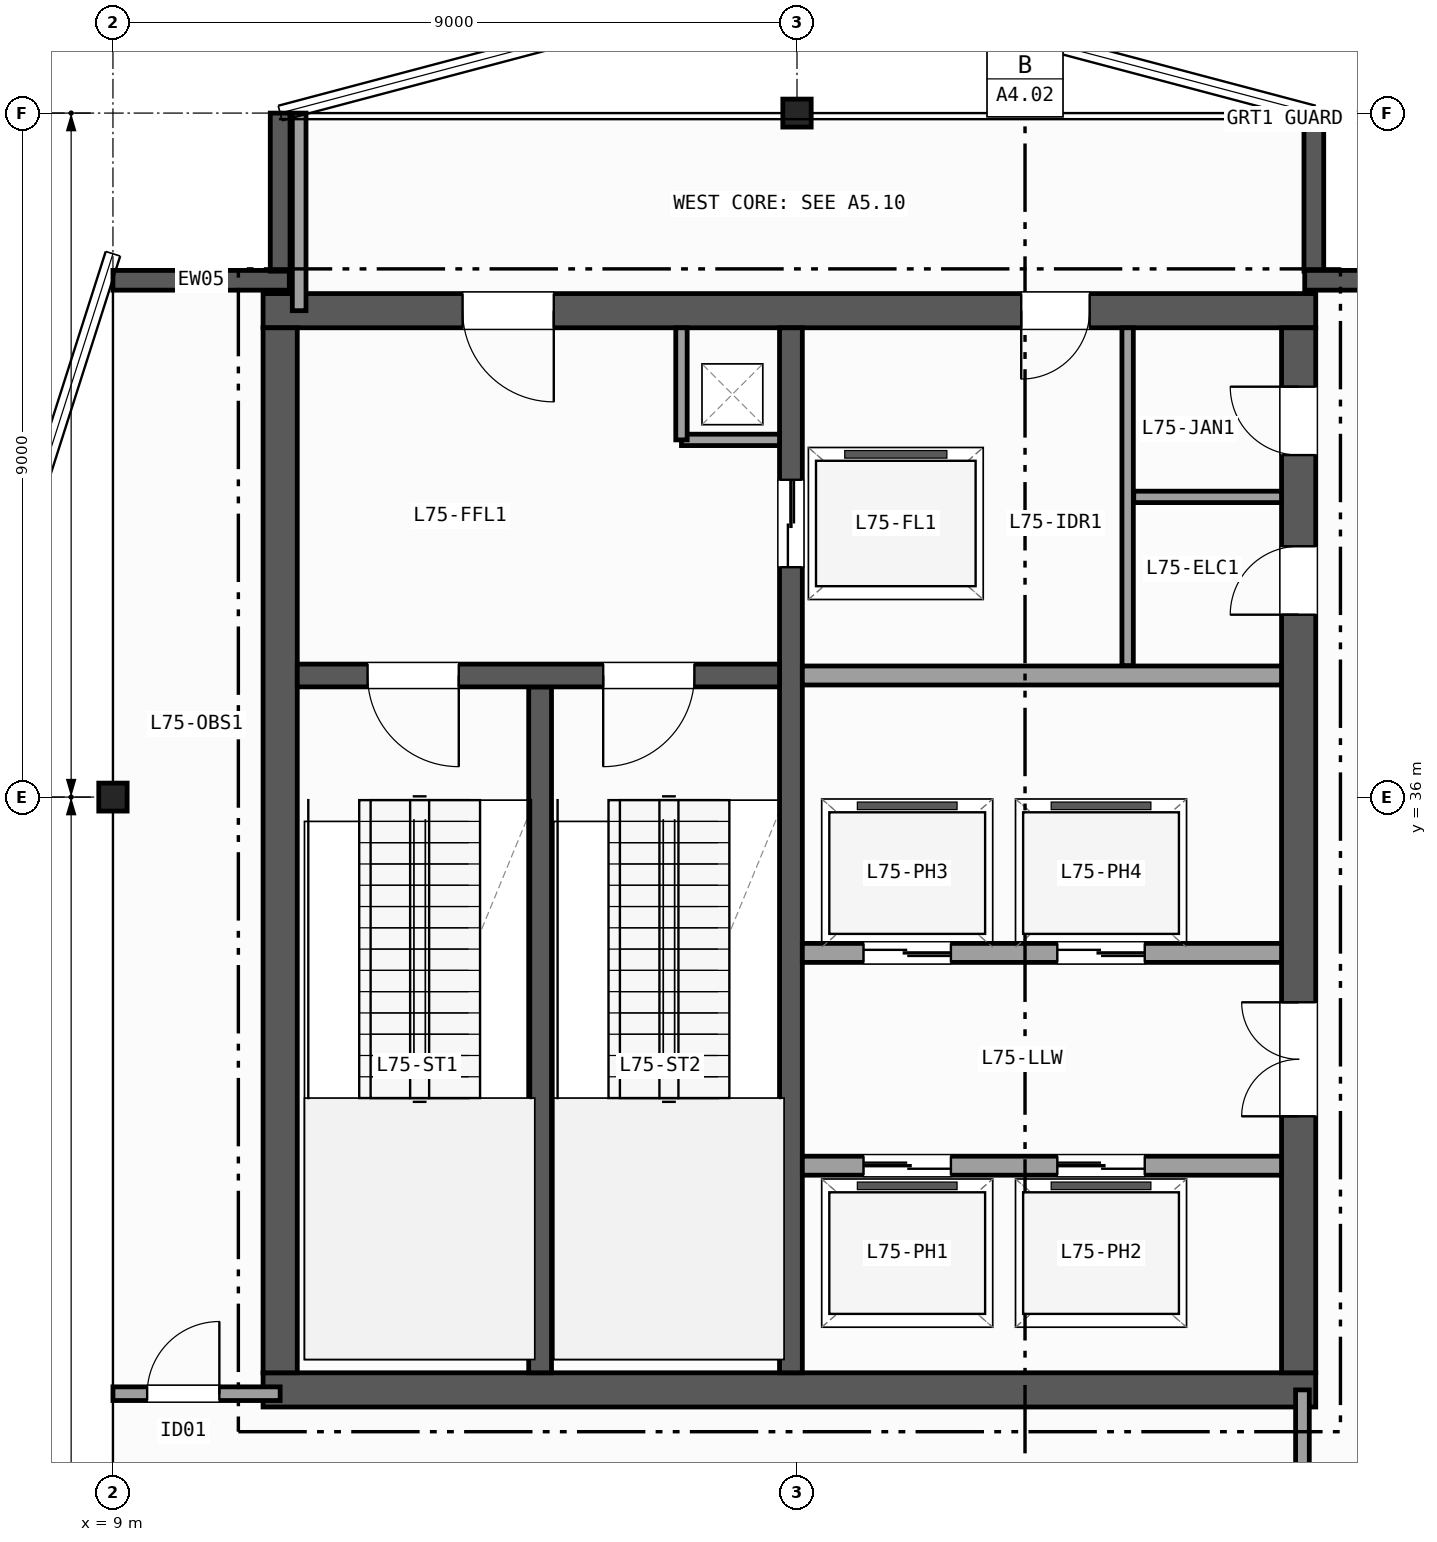
"""IFC4 building model, lengths in metres.
Left out: names, types, materials, properties, quantities, classifications, styles, units other than length and angle.
Written with IfcOpenShell. Run it as: python <this file> out.ifc"""

import sys

from ifc_helpers import new_model, si_unit, direction, frame, frame_2d, origin, origin_2d, place, context, subcontext, project, spatial, rectangle, i_section, extrude, element, fill, save


model = new_model("IFC4")
c1 = context("Model", 3, precision=1e-05, world=origin(), true_north=direction((0.0, 1.0)))
c2 = subcontext(c1, "Body", "Model", "MODEL_VIEW")
j1 = project(units=[si_unit("LENGTHUNIT", "METRE"), si_unit("PLANEANGLEUNIT", "RADIAN")], contexts=[c1])
p1 = place(None, origin())
s1 = spatial("IfcSite", under=j1, at=p1, CompositionType="ELEMENT")
p2 = place(p1, origin())
s2 = spatial("IfcBuilding", under=s1, at=p2, CompositionType="ELEMENT")
p3 = place(p2, frame((0.0, 0.0, 297.4)))
s3 = spatial("IfcBuildingStorey", under=s2, at=p3, CompositionType="ELEMENT", Elevation=297.4)
for number, where, z_axis, x_axis in (
    (1, (9.0, 36.0, 0.0), (0.0, 0.0, 1.0), (1.0, 0.0, 0.0)),
    (2, (18.0, 45.0, 0.0), (0.0, 0.0, 1.0), (1.0, 0.0, 0.0)),
):
    element("IfcColumn", number, at=place(p3, frame(where, z_axis=z_axis, x_axis=x_axis)), inside=s3, PredefinedType="COLUMN", context=c2, shape_type="SweptSolid", body=[
        extrude(i_section(OverallWidth=0.373, OverallDepth=0.368, WebThickness=0.015, FlangeThickness=0.024, FilletRadius=0.015, at=origin_2d()), origin(), (0.0, 0.0, 1.0), 5.2),
    ])
p4 = place(p3, frame((9.0, 42.8, 0.0), z_axis=(0.0, 0.0, 1.0), x_axis=(1.0, 0.0, 0.0)))
e3 = element("IfcWall", 3, at=p4, inside=s3, PredefinedType="SOLIDWALL", context=c2, shape_type="SweptSolid", body=[
    extrude(rectangle(XDim=2.32, YDim=0.26, at=frame_2d((1.16, 0.0))), origin(), (0.0, 0.0, 1.0), 4.87),
])
for number, where, z_axis, x_axis in (
    (4, (11.2, 42.92, 0.0), (0.0, 0.0, 1.0), (0.0, 1.0, 0.0)),
    (5, (24.8, 45.0, 0.0), (0.0, 0.0, 1.0), (0.0, -1.0, 0.0)),
):
    element("IfcWall", number, at=place(p3, frame(where, z_axis=z_axis, x_axis=x_axis)), inside=s3, PredefinedType="SOLIDWALL", context=c2, shape_type="SweptSolid", body=[
        extrude(rectangle(XDim=2.08, YDim=0.26, at=frame_2d((1.04, 0.0))), origin(), (0.0, 0.0, 1.0), 4.87),
    ])
p5 = place(p3, frame((24.68, 42.8, 0.0), z_axis=(0.0, 0.0, 1.0), x_axis=(1.0, 0.0, 0.0)))
e6 = element("IfcWall", 6, at=p5, inside=s3, PredefinedType="SOLIDWALL", context=c2, shape_type="SweptSolid", body=[
    extrude(rectangle(XDim=2.32, YDim=0.26, at=frame_2d((1.16, 0.0))), origin(), (0.0, 0.0, 1.0), 4.87),
])
p6 = place(p3, frame((10.975, 28.2, 0.0), z_axis=(0.0, 0.0, 1.0), x_axis=(1.0, 0.0, 0.0)))
e7 = element("IfcWall", 7, at=p6, inside=s3, PredefinedType="SHEAR", context=c2, shape_type="SweptSolid", body=[
    extrude(rectangle(XDim=13.85, YDim=0.45, at=frame_2d((6.925, 0.0))), origin(), (0.0, 0.0, 1.0), 4.87),
])
p7 = place(p3, frame((24.825, 42.4, 0.0), z_axis=(0.0, 0.0, 1.0), x_axis=(-1.0, 0.0, 0.0)))
e8 = element("IfcWall", 8, at=p7, inside=s3, PredefinedType="SHEAR", context=c2, shape_type="SweptSolid", body=[
    extrude(rectangle(XDim=13.85, YDim=0.45, at=frame_2d((6.925, 0.0))), origin(), (0.0, 0.0, 1.0), 4.87),
])
p8 = place(p7, frame((10.025, 0.0, 0.0)))
e9 = element("IfcOpeningElement", 9, at=p8, cuts=e8, PredefinedType="OPENING", context=c2, shape_type="SweptSolid", body=[
    extrude(rectangle(XDim=1.2, YDim=2.15, at=frame_2d((0.6, 1.075))), frame((0.0, 0.235, 0.0), z_axis=(0.0, -1.0, 0.0), x_axis=(1.0, 0.0, 0.0)), (0.0, 0.0, 1.0), 0.47),
])
p9 = place(p7, frame((2.975, 0.0, 0.0)))
e10 = element("IfcOpeningElement", 10, at=p9, cuts=e8, PredefinedType="OPENING", context=c2, shape_type="SweptSolid", body=[
    extrude(rectangle(XDim=0.9, YDim=2.1, at=frame_2d((0.45, 1.05))), frame((0.0, 0.235, 0.0), z_axis=(0.0, -1.0, 0.0), x_axis=(1.0, 0.0, 0.0)), (0.0, 0.0, 1.0), 0.47),
])
p10 = place(p3, frame((11.2, 42.175, 0.0), z_axis=(0.0, 0.0, 1.0), x_axis=(0.0, -1.0, 0.0)))
e11 = element("IfcWall", 11, at=p10, inside=s3, PredefinedType="SHEAR", context=c2, shape_type="SweptSolid", body=[
    extrude(rectangle(XDim=13.75, YDim=0.45, at=frame_2d((6.875, 0.0))), origin(), (0.0, 0.0, 1.0), 4.87),
])
p11 = place(p3, frame((24.6, 28.425, 0.0), z_axis=(0.0, 0.0, 1.0), x_axis=(0.0, 1.0, 0.0)))
e12 = element("IfcWall", 12, at=p11, inside=s3, PredefinedType="SHEAR", context=c2, shape_type="SweptSolid", body=[
    extrude(rectangle(XDim=13.75, YDim=0.45, at=frame_2d((6.875, 0.0))), origin(), (0.0, 0.0, 1.0), 4.87),
])
p12 = place(p11, frame((3.375, 0.0, 0.0)))
e13 = element("IfcOpeningElement", 13, at=p12, cuts=e12, PredefinedType="OPENING", context=c2, shape_type="SweptSolid", body=[
    extrude(rectangle(XDim=1.5, YDim=2.2, at=frame_2d((0.75, 1.1))), frame((0.0, 0.235, 0.0), z_axis=(0.0, -1.0, 0.0), x_axis=(1.0, 0.0, 0.0)), (0.0, 0.0, 1.0), 0.47),
])
p13 = place(p11, frame((9.975, 0.0, 0.0)))
e14 = element("IfcOpeningElement", 14, at=p13, cuts=e12, PredefinedType="OPENING", context=c2, shape_type="SweptSolid", body=[
    extrude(rectangle(XDim=0.9, YDim=2.1, at=frame_2d((0.45, 1.05))), frame((0.0, 0.235, 0.0), z_axis=(0.0, -1.0, 0.0), x_axis=(1.0, 0.0, 0.0)), (0.0, 0.0, 1.0), 0.47),
])
p14 = place(p11, frame((12.075, 0.0, 0.0)))
e15 = element("IfcOpeningElement", 15, at=p14, cuts=e12, PredefinedType="OPENING", context=c2, shape_type="SweptSolid", body=[
    extrude(rectangle(XDim=0.9, YDim=2.1, at=frame_2d((0.45, 1.05))), frame((0.0, 0.235, 0.0), z_axis=(0.0, -1.0, 0.0), x_axis=(1.0, 0.0, 0.0)), (0.0, 0.0, 1.0), 0.47),
])
p15 = place(p3, frame((14.62, 28.425, 0.0), z_axis=(0.0, 0.0, 1.0), x_axis=(0.0, 1.0, 0.0)))
e16 = element("IfcWall", 16, at=p15, inside=s3, PredefinedType="SHEAR", context=c2, shape_type="SweptSolid", body=[
    extrude(rectangle(XDim=9.025, YDim=0.3, at=frame_2d((4.512, 0.0))), origin(), (0.0, 0.0, 1.0), 4.87),
])
p16 = place(p3, frame((17.92, 42.175, 0.0), z_axis=(0.0, 0.0, 1.0), x_axis=(0.0, -1.0, 0.0)))
e17 = element("IfcWall", 17, at=p16, inside=s3, PredefinedType="SHEAR", context=c2, shape_type="SweptSolid", body=[
    extrude(rectangle(XDim=13.75, YDim=0.3, at=frame_2d((6.875, 0.0))), origin(), (0.0, 0.0, 1.0), 4.87),
])
p17 = place(p16, frame((2.0, 0.0, 0.0)))
e18 = element("IfcOpeningElement", 18, at=p17, cuts=e17, PredefinedType="OPENING", context=c2, shape_type="SweptSolid", body=[
    extrude(rectangle(XDim=1.15, YDim=2.15, at=frame_2d((0.575, 1.075))), frame((0.0, 0.16, 0.0), z_axis=(0.0, -1.0, 0.0), x_axis=(1.0, 0.0, 0.0)), (0.0, 0.0, 1.0), 0.32),
])
p18 = place(p3, frame((17.77, 37.6, 0.0), z_axis=(0.0, 0.0, 1.0), x_axis=(-1.0, 0.0, 0.0)))
e19 = element("IfcWall", 19, at=p18, inside=s3, PredefinedType="SHEAR", context=c2, shape_type="SweptSolid", body=[
    extrude(rectangle(XDim=6.345, YDim=0.3, at=frame_2d((3.172, 0.0))), origin(), (0.0, 0.0, 1.0), 4.87),
])
p19 = place(p18, frame((4.22, 0.0, 0.0)))
e20 = element("IfcOpeningElement", 20, at=p19, cuts=e19, PredefinedType="OPENING", context=c2, shape_type="SweptSolid", body=[
    extrude(rectangle(XDim=1.2, YDim=2.15, at=frame_2d((0.6, 1.075))), frame((0.0, 0.16, 0.0), z_axis=(0.0, -1.0, 0.0), x_axis=(1.0, 0.0, 0.0)), (0.0, 0.0, 1.0), 0.32),
])
p20 = place(p18, frame((1.12, 0.0, 0.0)))
e21 = element("IfcOpeningElement", 21, at=p20, cuts=e19, PredefinedType="OPENING", context=c2, shape_type="SweptSolid", body=[
    extrude(rectangle(XDim=1.2, YDim=2.15, at=frame_2d((0.6, 1.075))), frame((0.0, 0.16, 0.0), z_axis=(0.0, -1.0, 0.0), x_axis=(1.0, 0.0, 0.0)), (0.0, 0.0, 1.0), 0.32),
])
p21 = place(p3, frame((16.48, 40.7, 0.0), z_axis=(0.0, 0.0, 1.0), x_axis=(1.0, 0.0, 0.0)))
e22 = element("IfcWall", 22, at=p21, inside=s3, PredefinedType="PARTITIONING", context=c2, shape_type="SweptSolid", body=[
    extrude(rectangle(XDim=1.29, YDim=0.15, at=frame_2d((0.645, 0.0))), origin(), (0.0, 0.0, 1.0), 4.87),
])
p22 = place(p3, frame((16.48, 40.7, 0.0), z_axis=(0.0, 0.0, 1.0), x_axis=(0.0, 1.0, 0.0)))
e23 = element("IfcWall", 23, at=p22, inside=s3, PredefinedType="PARTITIONING", context=c2, shape_type="SweptSolid", body=[
    extrude(rectangle(XDim=1.475, YDim=0.15, at=frame_2d((0.738, 0.0))), origin(), (0.0, 0.0, 1.0), 4.87),
])
p23 = place(p3, frame((18.07, 37.6, 0.0), z_axis=(0.0, 0.0, 1.0), x_axis=(1.0, 0.0, 0.0)))
e24 = element("IfcWall", 24, at=p23, inside=s3, PredefinedType="PARTITIONING", context=c2, shape_type="SweptSolid", body=[
    extrude(rectangle(XDim=6.305, YDim=0.25, at=frame_2d((3.152, 0.0))), origin(), (0.0, 0.0, 1.0), 4.87),
])
p24 = place(p3, frame((18.07, 31.15, 0.0), z_axis=(0.0, 0.0, 1.0), x_axis=(1.0, 0.0, 0.0)))
e25 = element("IfcWall", 25, at=p24, inside=s3, PredefinedType="PARTITIONING", context=c2, shape_type="SweptSolid", body=[
    extrude(rectangle(XDim=6.305, YDim=0.25, at=frame_2d((3.152, 0.0))), origin(), (0.0, 0.0, 1.0), 4.87),
])
p25 = place(p24, frame((0.805, 0.0, 0.0)))
e26 = element("IfcOpeningElement", 26, at=p25, cuts=e25, PredefinedType="OPENING", context=c2, shape_type="SweptSolid", body=[
    extrude(rectangle(XDim=1.15, YDim=2.15, at=frame_2d((0.575, 1.075))), frame((0.0, 0.135, 0.0), z_axis=(0.0, -1.0, 0.0), x_axis=(1.0, 0.0, 0.0)), (0.0, 0.0, 1.0), 0.27),
])
p26 = place(p24, frame((3.355, 0.0, 0.0)))
e27 = element("IfcOpeningElement", 27, at=p26, cuts=e25, PredefinedType="OPENING", context=c2, shape_type="SweptSolid", body=[
    extrude(rectangle(XDim=1.15, YDim=2.15, at=frame_2d((0.575, 1.075))), frame((0.0, 0.135, 0.0), z_axis=(0.0, -1.0, 0.0), x_axis=(1.0, 0.0, 0.0)), (0.0, 0.0, 1.0), 0.27),
])
p27 = place(p3, frame((24.375, 33.95, 0.0), z_axis=(0.0, 0.0, 1.0), x_axis=(-1.0, 0.0, 0.0)))
e28 = element("IfcWall", 28, at=p27, inside=s3, PredefinedType="PARTITIONING", context=c2, shape_type="SweptSolid", body=[
    extrude(rectangle(XDim=6.305, YDim=0.25, at=frame_2d((3.152, 0.0))), origin(), (0.0, 0.0, 1.0), 4.87),
])
p28 = place(p27, frame((4.35, 0.0, 0.0)))
e29 = element("IfcOpeningElement", 29, at=p28, cuts=e28, PredefinedType="OPENING", context=c2, shape_type="SweptSolid", body=[
    extrude(rectangle(XDim=1.15, YDim=2.15, at=frame_2d((0.575, 1.075))), frame((0.0, 0.135, 0.0), z_axis=(0.0, -1.0, 0.0), x_axis=(1.0, 0.0, 0.0)), (0.0, 0.0, 1.0), 0.27),
])
p29 = place(p27, frame((1.8, 0.0, 0.0)))
e30 = element("IfcOpeningElement", 30, at=p29, cuts=e28, PredefinedType="OPENING", context=c2, shape_type="SweptSolid", body=[
    extrude(rectangle(XDim=1.15, YDim=2.15, at=frame_2d((0.575, 1.075))), frame((0.0, 0.135, 0.0), z_axis=(0.0, -1.0, 0.0), x_axis=(1.0, 0.0, 0.0)), (0.0, 0.0, 1.0), 0.27),
])
p30 = place(p3, frame((22.35, 37.73, 0.0), z_axis=(0.0, 0.0, 1.0), x_axis=(0.0, 1.0, 0.0)))
e31 = element("IfcWall", 31, at=p30, inside=s3, PredefinedType="PARTITIONING", context=c2, shape_type="SweptSolid", body=[
    extrude(rectangle(XDim=4.445, YDim=0.15, at=frame_2d((2.223, 0.0))), origin(), (0.0, 0.0, 1.0), 4.87),
])
p31 = place(p3, frame((22.43, 39.95, 0.0), z_axis=(0.0, 0.0, 1.0), x_axis=(1.0, 0.0, 0.0)))
e32 = element("IfcWall", 32, at=p31, inside=s3, PredefinedType="PARTITIONING", context=c2, shape_type="SweptSolid", body=[
    extrude(rectangle(XDim=1.945, YDim=0.15, at=frame_2d((0.973, 0.0))), origin(), (0.0, 0.0, 1.0), 4.87),
])
p32 = place(p3, frame((24.65, 9.0, 0.0), z_axis=(0.0, 0.0, 1.0), x_axis=(0.0, 1.0, 0.0)))
e33 = element("IfcWall", 33, at=p32, inside=s3, PredefinedType="PARTITIONING", context=c2, shape_type="SweptSolid", body=[
    extrude(rectangle(XDim=19.2, YDim=0.18, at=frame_2d((9.6, 0.0))), origin(), (0.0, 0.0, 1.0), 4.157),
])
p33 = place(p32, frame((12.5, 0.0, 0.0)))
e34 = element("IfcOpeningElement", 34, at=p33, cuts=e33, PredefinedType="OPENING", context=c2, shape_type="SweptSolid", body=[
    extrude(rectangle(XDim=1.4, YDim=2.15, at=frame_2d((0.7, 1.075))), frame((0.0, 0.1, 0.0), z_axis=(0.0, -1.0, 0.0), x_axis=(1.0, 0.0, 0.0)), (0.0, 0.0, 1.0), 0.2),
])
p34 = place(p3, frame((9.0, 28.15, 0.0), z_axis=(0.0, 0.0, 1.0), x_axis=(1.0, 0.0, 0.0)))
e35 = element("IfcWall", 35, at=p34, inside=s3, PredefinedType="PARTITIONING", context=c2, shape_type="SweptSolid", body=[
    extrude(rectangle(XDim=2.2, YDim=0.18, at=frame_2d((1.1, 0.0))), origin(), (0.0, 0.0, 1.0), 4.157),
])
p35 = place(p34, frame((0.45, 0.0, 0.0)))
e36 = element("IfcOpeningElement", 36, at=p35, cuts=e35, PredefinedType="OPENING", context=c2, shape_type="SweptSolid", body=[
    extrude(rectangle(XDim=0.95, YDim=2.1, at=frame_2d((0.475, 1.05))), frame((0.0, 0.1, 0.0), z_axis=(0.0, -1.0, 0.0), x_axis=(1.0, 0.0, 0.0)), (0.0, 0.0, 1.0), 0.2),
])
p36 = place(p3, frame((11.45, 42.4, 0.0), z_axis=(0.0, 0.0, 1.0), x_axis=(0.0, 1.0, 0.0)))
e37 = element("IfcWall", 37, at=p36, inside=s3, PredefinedType="PARTITIONING", context=c2, shape_type="SweptSolid", body=[
    extrude(rectangle(XDim=2.6, YDim=0.18, at=frame_2d((1.3, 0.0))), origin(), (0.0, 0.0, 1.0), 4.87),
])
p37 = place(p19, origin())
e38 = element("IfcDoor", 38, at=p37, inside=s3, OperationType="SINGLE_SWING_LEFT", PredefinedType="DOOR", context=c2, shape_type="SweptSolid", body=[
    extrude(rectangle(XDim=1.2, YDim=2.15, at=frame_2d((0.6, 1.075))), frame((0.0, 0.025, 0.0), z_axis=(0.0, -1.0, 0.0), x_axis=(1.0, 0.0, 0.0)), (0.0, 0.0, 1.0), 0.05),
])
fill(e20, e38)
p38 = place(p20, origin())
e39 = element("IfcDoor", 39, at=p38, inside=s3, OperationType="SINGLE_SWING_RIGHT", PredefinedType="DOOR", context=c2, shape_type="SweptSolid", body=[
    extrude(rectangle(XDim=1.2, YDim=2.15, at=frame_2d((0.6, 1.075))), frame((0.0, 0.025, 0.0), z_axis=(0.0, -1.0, 0.0), x_axis=(1.0, 0.0, 0.0)), (0.0, 0.0, 1.0), 0.05),
])
fill(e21, e39)
p39 = place(p12, origin())
e40 = element("IfcDoor", 40, at=p39, inside=s3, OperationType="DOUBLE_DOOR_SINGLE_SWING", PredefinedType="DOOR", context=c2, shape_type="SweptSolid", body=[
    extrude(rectangle(XDim=1.5, YDim=2.2, at=frame_2d((0.75, 1.1))), frame((0.0, 0.025, 0.0), z_axis=(0.0, -1.0, 0.0), x_axis=(1.0, 0.0, 0.0)), (0.0, 0.0, 1.0), 0.05),
])
fill(e13, e40)
p40 = place(p8, origin())
e41 = element("IfcDoor", 41, at=p40, inside=s3, OperationType="SINGLE_SWING_LEFT", PredefinedType="DOOR", context=c2, shape_type="SweptSolid", body=[
    extrude(rectangle(XDim=1.2, YDim=2.15, at=frame_2d((0.6, 1.075))), frame((0.0, 0.025, 0.0), z_axis=(0.0, -1.0, 0.0), x_axis=(1.0, 0.0, 0.0)), (0.0, 0.0, 1.0), 0.05),
])
fill(e9, e41)
p41 = place(p13, origin())
e42 = element("IfcDoor", 42, at=p41, inside=s3, OperationType="SINGLE_SWING_LEFT", PredefinedType="DOOR", context=c2, shape_type="SweptSolid", body=[
    extrude(rectangle(XDim=0.9, YDim=2.1, at=frame_2d((0.45, 1.05))), frame((0.0, 0.025, 0.0), z_axis=(0.0, -1.0, 0.0), x_axis=(1.0, 0.0, 0.0)), (0.0, 0.0, 1.0), 0.05),
])
fill(e14, e42)
p42 = place(p9, origin())
e43 = element("IfcDoor", 43, at=p42, inside=s3, OperationType="SINGLE_SWING_RIGHT", PredefinedType="DOOR", context=c2, shape_type="SweptSolid", body=[
    extrude(rectangle(XDim=0.9, YDim=2.1, at=frame_2d((0.45, 1.05))), frame((0.0, 0.025, 0.0), z_axis=(0.0, -1.0, 0.0), x_axis=(1.0, 0.0, 0.0)), (0.0, 0.0, 1.0), 0.05),
])
fill(e10, e43)
p43 = place(p14, origin())
e44 = element("IfcDoor", 44, at=p43, inside=s3, OperationType="SINGLE_SWING_RIGHT", PredefinedType="DOOR", context=c2, shape_type="SweptSolid", body=[
    extrude(rectangle(XDim=0.9, YDim=2.1, at=frame_2d((0.45, 1.05))), frame((0.0, 0.025, 0.0), z_axis=(0.0, -1.0, 0.0), x_axis=(1.0, 0.0, 0.0)), (0.0, 0.0, 1.0), 0.05),
])
fill(e15, e44)
p44 = place(p17, origin())
e45 = element("IfcDoor", 45, at=p44, inside=s3, OperationType="DOUBLE_DOOR_SLIDING", PredefinedType="DOOR", context=c2, shape_type="SweptSolid", body=[
    extrude(rectangle(XDim=1.15, YDim=2.15, at=frame_2d((0.575, 1.075))), frame((0.0, 0.025, 0.0), z_axis=(0.0, -1.0, 0.0), x_axis=(1.0, 0.0, 0.0)), (0.0, 0.0, 1.0), 0.05),
])
fill(e18, e45)
p45 = place(p25, origin())
e46 = element("IfcDoor", 46, at=p45, inside=s3, OperationType="DOUBLE_DOOR_SLIDING", PredefinedType="DOOR", context=c2, shape_type="SweptSolid", body=[
    extrude(rectangle(XDim=1.15, YDim=2.15, at=frame_2d((0.575, 1.075))), frame((0.0, 0.025, 0.0), z_axis=(0.0, -1.0, 0.0), x_axis=(1.0, 0.0, 0.0)), (0.0, 0.0, 1.0), 0.05),
])
fill(e26, e46)
p46 = place(p26, origin())
e47 = element("IfcDoor", 47, at=p46, inside=s3, OperationType="DOUBLE_DOOR_SLIDING", PredefinedType="DOOR", context=c2, shape_type="SweptSolid", body=[
    extrude(rectangle(XDim=1.15, YDim=2.15, at=frame_2d((0.575, 1.075))), frame((0.0, 0.025, 0.0), z_axis=(0.0, -1.0, 0.0), x_axis=(1.0, 0.0, 0.0)), (0.0, 0.0, 1.0), 0.05),
])
fill(e27, e47)
p47 = place(p28, origin())
e48 = element("IfcDoor", 48, at=p47, inside=s3, OperationType="DOUBLE_DOOR_SLIDING", PredefinedType="DOOR", context=c2, shape_type="SweptSolid", body=[
    extrude(rectangle(XDim=1.15, YDim=2.15, at=frame_2d((0.575, 1.075))), frame((0.0, 0.025, 0.0), z_axis=(0.0, -1.0, 0.0), x_axis=(1.0, 0.0, 0.0)), (0.0, 0.0, 1.0), 0.05),
])
fill(e29, e48)
p48 = place(p29, origin())
e49 = element("IfcDoor", 49, at=p48, inside=s3, OperationType="DOUBLE_DOOR_SLIDING", PredefinedType="DOOR", context=c2, shape_type="SweptSolid", body=[
    extrude(rectangle(XDim=1.15, YDim=2.15, at=frame_2d((0.575, 1.075))), frame((0.0, 0.025, 0.0), z_axis=(0.0, -1.0, 0.0), x_axis=(1.0, 0.0, 0.0)), (0.0, 0.0, 1.0), 0.05),
])
fill(e30, e49)
p49 = place(p35, origin())
e50 = element("IfcDoor", 50, at=p49, inside=s3, OperationType="SINGLE_SWING_RIGHT", PredefinedType="DOOR", context=c2, shape_type="SweptSolid", body=[
    extrude(rectangle(XDim=0.95, YDim=2.1, at=frame_2d((0.475, 1.05))), frame((0.0, 0.025, 0.0), z_axis=(0.0, -1.0, 0.0), x_axis=(1.0, 0.0, 0.0)), (0.0, 0.0, 1.0), 0.05),
])
fill(e36, e50)
save(model, sys.argv[1])
